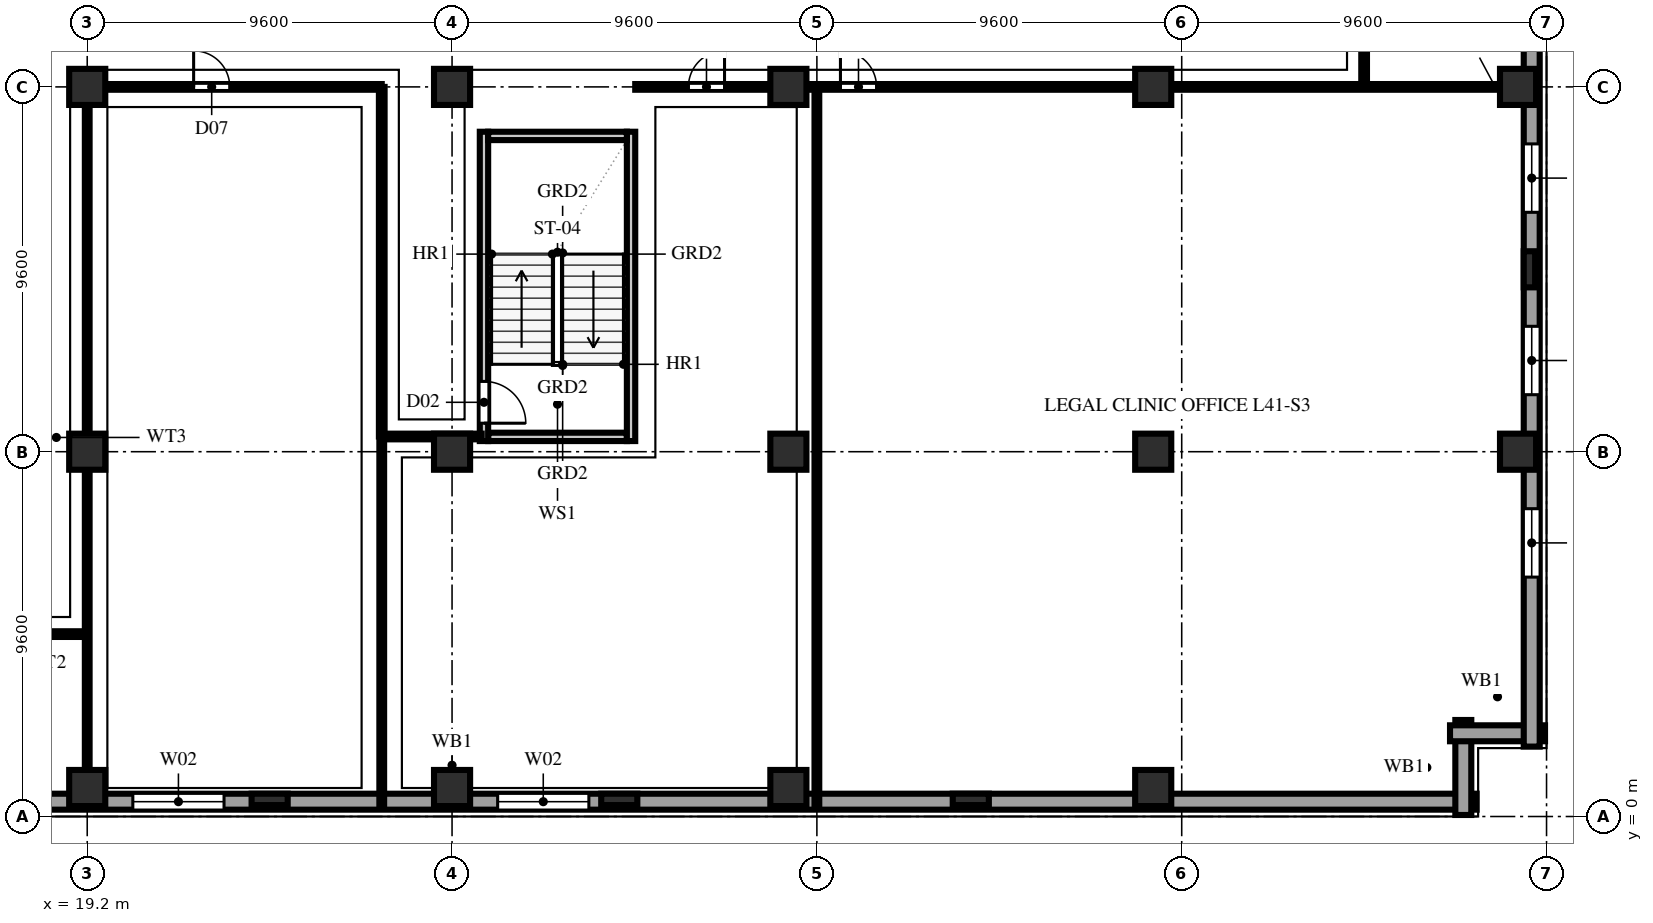
"""IFC4 building model, lengths in metres.
Left out: names, types, materials, properties, quantities, classifications, styles, units other than length and angle.
Written with IfcOpenShell. Run it as: python <this file> out.ifc"""

import sys

from ifc_helpers import new_model, si_unit, direction, frame, frame_2d, origin, origin_2d, place, context, subcontext, project, spatial, rectangle, extrude, element, fill, save


model = new_model("IFC4")
c1 = context("Model", 3, precision=1e-05, world=origin(), true_north=direction((0.0, 1.0)))
c2 = subcontext(c1, "Body", "Model", "MODEL_VIEW")
j1 = project(units=[si_unit("LENGTHUNIT", "METRE"), si_unit("PLANEANGLEUNIT", "RADIAN")], contexts=[c1])
p1 = place(None, origin())
s1 = spatial("IfcSite", under=j1, at=p1, CompositionType="ELEMENT")
p2 = place(p1, origin())
s2 = spatial("IfcBuilding", under=s1, at=p2, CompositionType="ELEMENT")
p3 = place(p2, frame((0.0, 0.0, 163.6)))
s3 = spatial("IfcBuildingStorey", under=s2, at=p3, CompositionType="ELEMENT", Elevation=163.6)
for number, where, z_axis, x_axis in (
    (1, (19.2, 0.75, 0.0), (0.0, 0.0, 1.0), (1.0, 0.0, 0.0)),
    (2, (19.2, 9.6, 0.0), (0.0, 0.0, 1.0), (1.0, 0.0, 0.0)),
    (3, (19.2, 19.2, 0.0), (0.0, 0.0, 1.0), (1.0, 0.0, 0.0)),
    (4, (28.8, 0.75, 0.0), (0.0, 0.0, 1.0), (1.0, 0.0, 0.0)),
    (5, (28.8, 9.6, 0.0), (0.0, 0.0, 1.0), (1.0, 0.0, 0.0)),
    (6, (28.8, 19.2, 0.0), (0.0, 0.0, 1.0), (1.0, 0.0, 0.0)),
    (7, (37.65, 0.75, 0.0), (0.0, 0.0, 1.0), (1.0, 0.0, 0.0)),
    (8, (37.65, 9.6, 0.0), (0.0, 0.0, 1.0), (1.0, 0.0, 0.0)),
    (9, (37.65, 19.2, 0.0), (0.0, 0.0, 1.0), (1.0, 0.0, 0.0)),
    (10, (47.25, 0.75, 0.0), (0.0, 0.0, 1.0), (1.0, 0.0, 0.0)),
    (11, (47.25, 9.6, 0.0), (0.0, 0.0, 1.0), (1.0, 0.0, 0.0)),
    (12, (47.25, 19.2, 0.0), (0.0, 0.0, 1.0), (1.0, 0.0, 0.0)),
    (13, (56.85, 9.6, 0.0), (0.0, 0.0, 1.0), (1.0, 0.0, 0.0)),
    (14, (56.85, 19.2, 0.0), (0.0, 0.0, 1.0), (1.0, 0.0, 0.0)),
):
    element("IfcColumn", number, at=place(p3, frame(where, z_axis=z_axis, x_axis=x_axis)), inside=s3, PredefinedType="COLUMN", context=c2, shape_type="SweptSolid", body=[
        extrude(rectangle(XDim=0.95, YDim=0.95, at=origin_2d()), origin(), (0.0, 0.0, 1.0), 3.8),
    ])
for number, where, z_axis, x_axis in (
    (15, (24.0, 0.45, 0.0), (0.0, 0.0, 1.0), (1.0, 0.0, 0.0)),
    (16, (33.2, 0.45, 0.0), (0.0, 0.0, 1.0), (1.0, 0.0, 0.0)),
    (17, (42.45, 0.45, 0.0), (0.0, 0.0, 1.0), (1.0, 0.0, 0.0)),
    (18, (57.15, 14.4, 0.0), (0.0, 0.0, 1.0), (0.0, 1.0, 0.0)),
):
    element("IfcColumn", number, at=place(p3, frame(where, z_axis=z_axis, x_axis=x_axis)), inside=s3, PredefinedType="PILASTER", context=c2, shape_type="SweptSolid", body=[
        extrude(rectangle(XDim=0.95, YDim=0.3, at=origin_2d()), origin(), (0.0, 0.0, 1.0), 3.8),
    ])
p4 = place(p3, frame((1.84, 0.39, 0.0), z_axis=(0.0, 0.0, 1.0), x_axis=(1.0, 0.0, 0.0)))
e19 = element("IfcWall", 19, at=p4, inside=s3, PredefinedType="SOLIDWALL", context=c2, shape_type="SweptSolid", body=[
    extrude(rectangle(XDim=53.92, YDim=0.42, at=frame_2d((26.96, 0.0))), origin(), (0.0, 0.0, 1.0), 3.54),
])
p5 = place(p4, frame((4.16, 0.0, 0.85)))
e20 = element("IfcOpeningElement", 20, at=p5, cuts=e19, PredefinedType="OPENING", context=c2, shape_type="SweptSolid", body=[
    extrude(rectangle(XDim=2.4, YDim=1.85, at=frame_2d((1.2, 0.925))), frame((0.0, 0.222, 0.0), z_axis=(0.0, -1.0, 0.0), x_axis=(1.0, 0.0, 0.0)), (0.0, 0.0, 1.0), 0.444),
])
p6 = place(p4, frame((8.96, 0.0, 0.85)))
e21 = element("IfcOpeningElement", 21, at=p6, cuts=e19, PredefinedType="OPENING", context=c2, shape_type="SweptSolid", body=[
    extrude(rectangle(XDim=2.4, YDim=1.85, at=frame_2d((1.2, 0.925))), frame((0.0, 0.222, 0.0), z_axis=(0.0, -1.0, 0.0), x_axis=(1.0, 0.0, 0.0)), (0.0, 0.0, 1.0), 0.444),
])
p7 = place(p4, frame((18.56, 0.0, 0.85)))
e22 = element("IfcOpeningElement", 22, at=p7, cuts=e19, PredefinedType="OPENING", context=c2, shape_type="SweptSolid", body=[
    extrude(rectangle(XDim=2.4, YDim=1.85, at=frame_2d((1.2, 0.925))), frame((0.0, 0.222, 0.0), z_axis=(0.0, -1.0, 0.0), x_axis=(1.0, 0.0, 0.0)), (0.0, 0.0, 1.0), 0.444),
])
p8 = place(p4, frame((28.16, 0.0, 0.85)))
e23 = element("IfcOpeningElement", 23, at=p8, cuts=e19, PredefinedType="OPENING", context=c2, shape_type="SweptSolid", body=[
    extrude(rectangle(XDim=2.4, YDim=1.85, at=frame_2d((1.2, 0.925))), frame((0.0, 0.222, 0.0), z_axis=(0.0, -1.0, 0.0), x_axis=(1.0, 0.0, 0.0)), (0.0, 0.0, 1.0), 0.444),
])
for number, where, z_axis, x_axis in (
    (24, (55.41, 0.04, 0.0), (0.0, 0.0, 1.0), (0.0, 1.0, 0.0)),
    (25, (55.06, 2.19, 0.0), (0.0, 0.0, 1.0), (1.0, 0.0, 0.0)),
):
    element("IfcWall", number, at=place(p3, frame(where, z_axis=z_axis, x_axis=x_axis)), inside=s3, PredefinedType="SOLIDWALL", context=c2, shape_type="SweptSolid", body=[
        extrude(rectangle(XDim=2.5, YDim=0.42, at=frame_2d((1.25, 0.0))), origin(), (0.0, 0.0, 1.0), 3.54),
    ])
p9 = place(p3, frame((57.21, 1.84, 0.0), z_axis=(0.0, 0.0, 1.0), x_axis=(0.0, 1.0, 0.0)))
e26 = element("IfcWall", 26, at=p9, inside=s3, PredefinedType="SOLIDWALL", context=c2, shape_type="SweptSolid", body=[
    extrude(rectangle(XDim=34.72, YDim=0.42, at=frame_2d((17.36, 0.0))), origin(), (0.0, 0.0, 1.0), 3.54),
])
p10 = place(p9, frame((4.46, 0.0, 0.85)))
e27 = element("IfcOpeningElement", 27, at=p10, cuts=e26, PredefinedType="OPENING", context=c2, shape_type="SweptSolid", body=[
    extrude(rectangle(XDim=1.8, YDim=1.85, at=frame_2d((0.9, 0.925))), frame((0.0, 0.222, 0.0), z_axis=(0.0, -1.0, 0.0), x_axis=(1.0, 0.0, 0.0)), (0.0, 0.0, 1.0), 0.444),
])
p11 = place(p9, frame((9.26, 0.0, 0.85)))
e28 = element("IfcOpeningElement", 28, at=p11, cuts=e26, PredefinedType="OPENING", context=c2, shape_type="SweptSolid", body=[
    extrude(rectangle(XDim=1.8, YDim=1.85, at=frame_2d((0.9, 0.925))), frame((0.0, 0.222, 0.0), z_axis=(0.0, -1.0, 0.0), x_axis=(1.0, 0.0, 0.0)), (0.0, 0.0, 1.0), 0.444),
])
p12 = place(p9, frame((14.06, 0.0, 0.85)))
e29 = element("IfcOpeningElement", 29, at=p12, cuts=e26, PredefinedType="OPENING", context=c2, shape_type="SweptSolid", body=[
    extrude(rectangle(XDim=1.8, YDim=1.85, at=frame_2d((0.9, 0.925))), frame((0.0, 0.222, 0.0), z_axis=(0.0, -1.0, 0.0), x_axis=(1.0, 0.0, 0.0)), (0.0, 0.0, 1.0), 0.444),
])
p13 = place(p9, frame((23.66, 0.0, 0.85)))
e30 = element("IfcOpeningElement", 30, at=p13, cuts=e26, PredefinedType="OPENING", context=c2, shape_type="SweptSolid", body=[
    extrude(rectangle(XDim=1.8, YDim=1.85, at=frame_2d((0.9, 0.925))), frame((0.0, 0.222, 0.0), z_axis=(0.0, -1.0, 0.0), x_axis=(1.0, 0.0, 0.0)), (0.0, 0.0, 1.0), 0.444),
])
p14 = place(p9, frame((28.46, 0.0, 0.85)))
e31 = element("IfcOpeningElement", 31, at=p14, cuts=e26, PredefinedType="OPENING", context=c2, shape_type="SweptSolid", body=[
    extrude(rectangle(XDim=1.8, YDim=1.85, at=frame_2d((0.9, 0.925))), frame((0.0, 0.222, 0.0), z_axis=(0.0, -1.0, 0.0), x_axis=(1.0, 0.0, 0.0)), (0.0, 0.0, 1.0), 0.444),
])
p15 = place(p3, frame((29.75, 9.99, 0.0), z_axis=(0.0, 0.0, 1.0), x_axis=(1.0, 0.0, 0.0)))
e32 = element("IfcWall", 32, at=p15, inside=s3, PredefinedType="SOLIDWALL", context=c2, shape_type="SweptSolid", body=[
    extrude(rectangle(XDim=3.65, YDim=0.22, at=frame_2d((1.825, 0.0))), origin(), (0.0, 0.0, 1.0), 3.54),
])
p16 = place(p3, frame((29.64, 9.88, 0.0), z_axis=(0.0, 0.0, 1.0), x_axis=(0.0, 1.0, 0.0)))
e33 = element("IfcWall", 33, at=p16, inside=s3, PredefinedType="SOLIDWALL", context=c2, shape_type="SweptSolid", body=[
    extrude(rectangle(XDim=8.14, YDim=0.22, at=frame_2d((4.07, 0.0))), origin(), (0.0, 0.0, 1.0), 3.54),
])
p17 = place(p16, frame((0.47, 0.0, 0.0)))
e34 = element("IfcOpeningElement", 34, at=p17, cuts=e33, PredefinedType="OPENING", context=c2, shape_type="SweptSolid", body=[
    extrude(rectangle(XDim=1.1, YDim=2.2, at=frame_2d((0.55, 1.1))), frame((0.0, 0.122, 0.0), z_axis=(0.0, -1.0, 0.0), x_axis=(1.0, 0.0, 0.0)), (0.0, 0.0, 1.0), 0.244),
])
p18 = place(p3, frame((33.51, 9.88, 0.0), z_axis=(0.0, 0.0, 1.0), x_axis=(0.0, 1.0, 0.0)))
e35 = element("IfcWall", 35, at=p18, inside=s3, PredefinedType="SOLIDWALL", context=c2, shape_type="SweptSolid", body=[
    extrude(rectangle(XDim=8.14, YDim=0.22, at=frame_2d((4.07, 0.0))), origin(), (0.0, 0.0, 1.0), 3.54),
])
p19 = place(p3, frame((29.75, 17.91, 0.0), z_axis=(0.0, 0.0, 1.0), x_axis=(1.0, 0.0, 0.0)))
e36 = element("IfcWall", 36, at=p19, inside=s3, PredefinedType="SOLIDWALL", context=c2, shape_type="SweptSolid", body=[
    extrude(rectangle(XDim=3.65, YDim=0.22, at=frame_2d((1.825, 0.0))), origin(), (0.0, 0.0, 1.0), 3.54),
])
p20 = place(p3, frame((17.05, 4.8, 0.0), z_axis=(0.0, 0.0, 1.0), x_axis=(1.0, 0.0, 0.0)))
e37 = element("IfcWall", 37, at=p20, inside=s3, PredefinedType="PARTITIONING", context=c2, shape_type="SweptSolid", body=[
    extrude(rectangle(XDim=2.15, YDim=0.15, at=frame_2d((1.075, 0.0))), origin(), (0.0, 0.0, 1.0), 3.54),
])
p21 = place(p3, frame((52.8, 19.2, 0.0), z_axis=(0.0, 0.0, 1.0), x_axis=(0.0, 1.0, 0.0)))
e38 = element("IfcWall", 38, at=p21, inside=s3, PredefinedType="PARTITIONING", context=c2, shape_type="SweptSolid", body=[
    extrude(rectangle(XDim=2.1, YDim=0.15, at=frame_2d((1.05, 0.0))), origin(), (0.0, 0.0, 1.0), 3.54),
])
p22 = place(p3, frame((19.2, 0.22, 0.0), z_axis=(0.0, 0.0, 1.0), x_axis=(0.0, 1.0, 0.0)))
e39 = element("IfcWall", 39, at=p22, inside=s3, PredefinedType="PARTITIONING", context=c2, shape_type="SweptSolid", body=[
    extrude(rectangle(XDim=0.53, YDim=0.125, at=frame_2d((0.265, 0.0))), origin(), (0.0, 0.0, 1.0), 3.54),
])
p23 = place(p3, frame((19.2, 0.75, 0.0), z_axis=(0.0, 0.0, 1.0), x_axis=(0.0, 1.0, 0.0)))
e40 = element("IfcWall", 40, at=p23, inside=s3, PredefinedType="PARTITIONING", context=c2, shape_type="SweptSolid", body=[
    extrude(rectangle(XDim=18.45, YDim=0.125, at=frame_2d((9.225, 0.0))), origin(), (0.0, 0.0, 1.0), 3.123),
])
p24 = place(p3, frame((19.2, 19.2, 0.0), z_axis=(0.0, 0.0, 1.0), x_axis=(1.0, 0.0, 0.0)))
e41 = element("IfcWall", 41, at=p24, inside=s3, PredefinedType="PARTITIONING", context=c2, shape_type="SweptSolid", body=[
    extrude(rectangle(XDim=7.75, YDim=0.15, at=frame_2d((3.875, 0.0))), origin(), (0.0, 0.0, 1.0), 3.123),
])
p25 = place(p24, frame((2.8, 0.0, 0.0)))
e42 = element("IfcOpeningElement", 42, at=p25, cuts=e41, PredefinedType="OPENING", context=c2, shape_type="SweptSolid", body=[
    extrude(rectangle(XDim=0.95, YDim=2.15, at=frame_2d((0.475, 1.075))), frame((0.0, 0.087, 0.0), z_axis=(0.0, -1.0, 0.0), x_axis=(1.0, 0.0, 0.0)), (0.0, 0.0, 1.0), 0.174),
])
p26 = place(p3, frame((26.95, 0.22, 0.0), z_axis=(0.0, 0.0, 1.0), x_axis=(0.0, 1.0, 0.0)))
e43 = element("IfcWall", 43, at=p26, inside=s3, PredefinedType="PARTITIONING", context=c2, shape_type="SweptSolid", body=[
    extrude(rectangle(XDim=9.78, YDim=0.125, at=frame_2d((4.89, 0.0))), origin(), (0.0, 0.0, 1.0), 3.54),
])
p27 = place(p3, frame((26.95, 10.0, 0.0), z_axis=(0.0, 0.0, 1.0), x_axis=(0.0, 1.0, 0.0)))
e44 = element("IfcWall", 44, at=p27, inside=s3, PredefinedType="PARTITIONING", context=c2, shape_type="SweptSolid", body=[
    extrude(rectangle(XDim=9.2, YDim=0.15, at=frame_2d((4.6, 0.0))), origin(), (0.0, 0.0, 1.0), 3.54),
])
p28 = place(p3, frame((26.95, 10.0, 0.0), z_axis=(0.0, 0.0, 1.0), x_axis=(1.0, 0.0, 0.0)))
e45 = element("IfcWall", 45, at=p28, inside=s3, PredefinedType="PARTITIONING", context=c2, shape_type="SweptSolid", body=[
    extrude(rectangle(XDim=2.63, YDim=0.15, at=frame_2d((1.315, 0.0))), origin(), (0.0, 0.0, 1.0), 3.54),
])
p29 = place(p3, frame((38.4, 0.22, 0.0), z_axis=(0.0, 0.0, 1.0), x_axis=(0.0, 1.0, 0.0)))
e46 = element("IfcWall", 46, at=p29, inside=s3, PredefinedType="PARTITIONING", context=c2, shape_type="SweptSolid", body=[
    extrude(rectangle(XDim=18.98, YDim=0.125, at=frame_2d((9.49, 0.0))), origin(), (0.0, 0.0, 1.0), 3.54),
])
p30 = place(p3, frame((33.62, 19.2, 0.0), z_axis=(0.0, 0.0, 1.0), x_axis=(1.0, 0.0, 0.0)))
e47 = element("IfcWall", 47, at=p30, inside=s3, PredefinedType="PARTITIONING", context=c2, shape_type="SweptSolid", body=[
    extrude(rectangle(XDim=23.23, YDim=0.15, at=frame_2d((11.615, 0.0))), origin(), (0.0, 0.0, 1.0), 3.123),
])
p31 = place(p30, frame((1.4, 0.0, 0.0)))
e48 = element("IfcOpeningElement", 48, at=p31, cuts=e47, PredefinedType="OPENING", context=c2, shape_type="SweptSolid", body=[
    extrude(rectangle(XDim=0.95, YDim=2.15, at=frame_2d((0.475, 1.075))), frame((0.0, 0.087, 0.0), z_axis=(0.0, -1.0, 0.0), x_axis=(1.0, 0.0, 0.0)), (0.0, 0.0, 1.0), 0.174),
])
p32 = place(p30, frame((5.4, 0.0, 0.0)))
e49 = element("IfcOpeningElement", 49, at=p32, cuts=e47, PredefinedType="OPENING", context=c2, shape_type="SweptSolid", body=[
    extrude(rectangle(XDim=0.95, YDim=2.15, at=frame_2d((0.475, 1.075))), frame((0.0, 0.087, 0.0), z_axis=(0.0, -1.0, 0.0), x_axis=(1.0, 0.0, 0.0)), (0.0, 0.0, 1.0), 0.174),
])
p33 = place(p3, frame((56.85, 19.2, 0.0), z_axis=(0.0, 0.0, 1.0), x_axis=(1.0, 0.0, 0.0)))
e50 = element("IfcWall", 50, at=p33, inside=s3, PredefinedType="PARTITIONING", context=c2, shape_type="SweptSolid", body=[
    extrude(rectangle(XDim=0.53, YDim=0.15, at=frame_2d((0.265, 0.0))), origin(), (0.0, 0.0, 1.0), 3.54),
])
p34 = place(p7, origin())
e51 = element("IfcWindow", 51, at=p34, inside=s3, PartitioningType="TRIPLE_PANEL_VERTICAL", PredefinedType="WINDOW", context=c2, shape_type="SweptSolid", body=[
    extrude(rectangle(XDim=2.4, YDim=1.85, at=frame_2d((1.2, 0.925))), frame((0.0, 0.11, 0.0), z_axis=(0.0, -1.0, 0.0), x_axis=(1.0, 0.0, 0.0)), (0.0, 0.0, 1.0), 0.06),
])
fill(e22, e51)
p35 = place(p8, origin())
e52 = element("IfcWindow", 52, at=p35, inside=s3, PartitioningType="TRIPLE_PANEL_VERTICAL", PredefinedType="WINDOW", context=c2, shape_type="SweptSolid", body=[
    extrude(rectangle(XDim=2.4, YDim=1.85, at=frame_2d((1.2, 0.925))), frame((0.0, 0.11, 0.0), z_axis=(0.0, -1.0, 0.0), x_axis=(1.0, 0.0, 0.0)), (0.0, 0.0, 1.0), 0.06),
])
fill(e23, e52)
p36 = place(p10, origin())
e53 = element("IfcWindow", 53, at=p36, inside=s3, PartitioningType="DOUBLE_PANEL_VERTICAL", PredefinedType="WINDOW", context=c2, shape_type="SweptSolid", body=[
    extrude(rectangle(XDim=1.8, YDim=1.85, at=frame_2d((0.9, 0.925))), frame((0.0, 0.11, 0.0), z_axis=(0.0, -1.0, 0.0), x_axis=(1.0, 0.0, 0.0)), (0.0, 0.0, 1.0), 0.06),
])
fill(e27, e53)
p37 = place(p11, origin())
e54 = element("IfcWindow", 54, at=p37, inside=s3, PartitioningType="DOUBLE_PANEL_VERTICAL", PredefinedType="WINDOW", context=c2, shape_type="SweptSolid", body=[
    extrude(rectangle(XDim=1.8, YDim=1.85, at=frame_2d((0.9, 0.925))), frame((0.0, 0.11, 0.0), z_axis=(0.0, -1.0, 0.0), x_axis=(1.0, 0.0, 0.0)), (0.0, 0.0, 1.0), 0.06),
])
fill(e28, e54)
p38 = place(p12, origin())
e55 = element("IfcWindow", 55, at=p38, inside=s3, PartitioningType="DOUBLE_PANEL_VERTICAL", PredefinedType="WINDOW", context=c2, shape_type="SweptSolid", body=[
    extrude(rectangle(XDim=1.8, YDim=1.85, at=frame_2d((0.9, 0.925))), frame((0.0, 0.11, 0.0), z_axis=(0.0, -1.0, 0.0), x_axis=(1.0, 0.0, 0.0)), (0.0, 0.0, 1.0), 0.06),
])
fill(e29, e55)
p39 = place(p17, frame((1.1, 0.0, 0.0), z_axis=(0.0, 0.0, 1.0), x_axis=(-1.0, 0.0, 0.0)))
e56 = element("IfcDoor", 56, at=p39, inside=s3, OperationType="SINGLE_SWING_RIGHT", PredefinedType="DOOR", context=c2, shape_type="SweptSolid", body=[
    extrude(rectangle(XDim=1.1, YDim=2.2, at=frame_2d((0.55, 1.1))), frame((0.0, 0.025, 0.0), z_axis=(0.0, -1.0, 0.0), x_axis=(1.0, 0.0, 0.0)), (0.0, 0.0, 1.0), 0.05),
])
fill(e34, e56)
p40 = place(p25, origin())
e57 = element("IfcDoor", 57, at=p40, inside=s3, OperationType="SINGLE_SWING_LEFT", PredefinedType="DOOR", context=c2, shape_type="SweptSolid", body=[
    extrude(rectangle(XDim=0.95, YDim=2.15, at=frame_2d((0.475, 1.075))), frame((0.0, 0.025, 0.0), z_axis=(0.0, -1.0, 0.0), x_axis=(1.0, 0.0, 0.0)), (0.0, 0.0, 1.0), 0.05),
])
fill(e42, e57)
p41 = place(p31, origin())
e58 = element("IfcDoor", 58, at=p41, inside=s3, OperationType="SINGLE_SWING_RIGHT", PredefinedType="DOOR", context=c2, shape_type="SweptSolid", body=[
    extrude(rectangle(XDim=0.95, YDim=2.15, at=frame_2d((0.475, 1.075))), frame((0.0, 0.025, 0.0), z_axis=(0.0, -1.0, 0.0), x_axis=(1.0, 0.0, 0.0)), (0.0, 0.0, 1.0), 0.05),
])
fill(e48, e58)
p42 = place(p32, origin())
e59 = element("IfcDoor", 59, at=p42, inside=s3, OperationType="SINGLE_SWING_LEFT", PredefinedType="DOOR", context=c2, shape_type="SweptSolid", body=[
    extrude(rectangle(XDim=0.95, YDim=2.15, at=frame_2d((0.475, 1.075))), frame((0.0, 0.025, 0.0), z_axis=(0.0, -1.0, 0.0), x_axis=(1.0, 0.0, 0.0)), (0.0, 0.0, 1.0), 0.05),
])
fill(e49, e59)
save(model, sys.argv[1])
